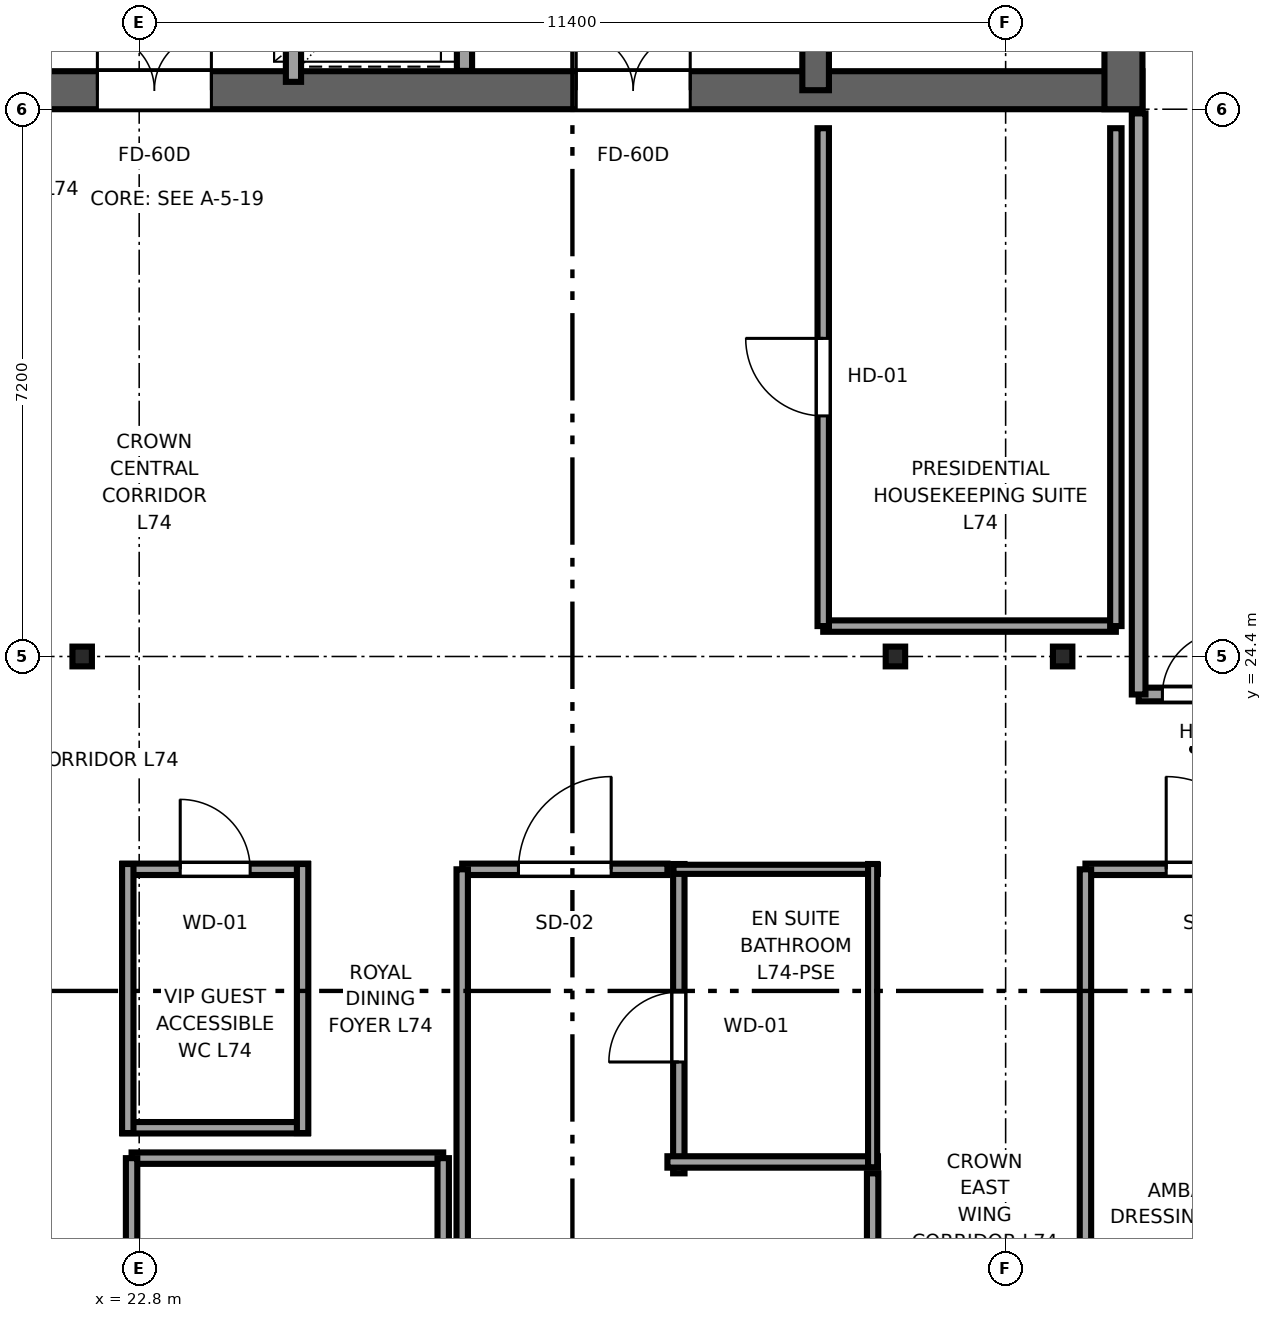
"""IFC4 building model, lengths in metres.
Left out: names, types, materials, properties, quantities, classifications, styles, units other than length and angle.
Written with IfcOpenShell. Run it as: python <this file> out.ifc"""

import sys

from ifc_helpers import new_model, si_unit, direction, frame, frame_2d, origin, origin_2d, place, context, subcontext, project, spatial, rectangle, i_section, extrude, source, transform, mapped, element, fill, save


model = new_model("IFC4")
c1 = context("Model", 3, precision=1e-05, world=origin(), true_north=direction((0.0, 1.0)))
c2 = subcontext(c1, "Body", "Model", "MODEL_VIEW")
j1 = project(units=[si_unit("LENGTHUNIT", "METRE"), si_unit("PLANEANGLEUNIT", "RADIAN")], contexts=[c1])
p1 = place(None, origin())
s1 = spatial("IfcSite", under=j1, at=p1, CompositionType="ELEMENT")
p2 = place(p1, origin())
s2 = spatial("IfcBuilding", under=s1, at=p2, CompositionType="ELEMENT")
p3 = place(p2, frame((0.0, 0.0, 278.6)))
s3 = spatial("IfcBuildingStorey", under=s2, at=p3, CompositionType="ELEMENT", Elevation=278.6)
p4 = place(p3, frame((10.0, 31.85, 0.0), z_axis=(0.0, 0.0, 1.0), x_axis=(1.0, 0.0, 0.0)))
e1 = element("IfcWall", 1, at=p4, inside=s3, PredefinedType="SHEAR", context=c2, shape_type="SweptSolid", body=[
    extrude(rectangle(XDim=26.0, YDim=0.5, at=frame_2d((13.0, 0.0))), origin(), (0.0, 0.0, 1.0), 3.55),
])
p5 = place(p4, frame((7.45, 0.0, 0.0), z_axis=(0.0, 0.0, 1.0), x_axis=(-1.0, 0.0, 0.0)))
e2 = element("IfcOpeningElement", 2, at=p5, cuts=e1, PredefinedType="OPENING", context=c2, shape_type="SweptSolid", body=[
    extrude(rectangle(XDim=1.5, YDim=2.04, at=frame_2d((0.75, 1.02))), frame((0.0, 0.26, 0.0), z_axis=(0.0, -1.0, 0.0), x_axis=(1.0, 0.0, 0.0)), (0.0, 0.0, 1.0), 0.52),
])
p6 = place(p4, frame((13.75, 0.0, 0.0), z_axis=(0.0, 0.0, 1.0), x_axis=(-1.0, 0.0, 0.0)))
e3 = element("IfcOpeningElement", 3, at=p6, cuts=e1, PredefinedType="OPENING", context=c2, shape_type="SweptSolid", body=[
    extrude(rectangle(XDim=1.5, YDim=2.04, at=frame_2d((0.75, 1.02))), frame((0.0, 0.26, 0.0), z_axis=(0.0, -1.0, 0.0), x_axis=(1.0, 0.0, 0.0)), (0.0, 0.0, 1.0), 0.52),
])
p7 = place(p4, frame((20.05, 0.0, 0.0), z_axis=(0.0, 0.0, 1.0), x_axis=(-1.0, 0.0, 0.0)))
e4 = element("IfcOpeningElement", 4, at=p7, cuts=e1, PredefinedType="OPENING", context=c2, shape_type="SweptSolid", body=[
    extrude(rectangle(XDim=1.5, YDim=2.04, at=frame_2d((0.75, 1.02))), frame((0.0, 0.26, 0.0), z_axis=(0.0, -1.0, 0.0), x_axis=(1.0, 0.0, 0.0)), (0.0, 0.0, 1.0), 0.52),
])
p8 = place(p3, frame((35.75, 31.6, 0.0), z_axis=(0.0, 0.0, 1.0), x_axis=(0.0, 1.0, 0.0)))
e5 = element("IfcWall", 5, at=p8, inside=s3, PredefinedType="SHEAR", context=c2, shape_type="SweptSolid", body=[
    extrude(rectangle(XDim=13.6, YDim=0.5, at=frame_2d((6.8, 0.0))), origin(), (0.0, 0.0, 1.0), 3.55),
])
p9 = place(p3, frame((31.7, 31.85, 0.0), z_axis=(0.0, 0.0, 1.0), x_axis=(0.0, 1.0, 0.0)))
e6 = element("IfcWall", 6, at=p9, inside=s3, PredefinedType="SHEAR", context=c2, shape_type="SweptSolid", body=[
    extrude(rectangle(XDim=13.1, YDim=0.35, at=frame_2d((6.55, 0.0))), origin(), (0.0, 0.0, 1.0), 3.55),
])
p10 = place(p9, frame((1.8, 0.0, 0.0), z_axis=(0.0, 0.0, 1.0), x_axis=(-1.0, 0.0, 0.0)))
e7 = element("IfcOpeningElement", 7, at=p10, cuts=e6, PredefinedType="OPENING", context=c2, shape_type="SweptSolid", body=[
    extrude(rectangle(XDim=1.1, YDim=2.12, at=frame_2d((0.55, 1.06))), frame((0.0, 0.185, 0.0), z_axis=(0.0, -1.0, 0.0), x_axis=(1.0, 0.0, 0.0)), (0.0, 0.0, 1.0), 0.37),
])
m1 = source(origin(), c2, "Body", "SweptSolid", [
    extrude(i_section(OverallWidth=0.256, OverallDepth=0.26, WebThickness=0.01, FlangeThickness=0.017, FilletRadius=0.014, at=origin_2d()), origin(), (0.0, 0.0, 1.0), 3.55),
])
for number, where, z_axis, x_axis in (
    (8, (22.05, 24.4, 0.0), (0.0, 0.0, 1.0), (1.0, 0.0, 0.0)),
    (9, (32.75, 24.4, 0.0), (0.0, 0.0, 1.0), (1.0, 0.0, 0.0)),
    (10, (34.95, 24.4, 0.0), (0.0, 0.0, 1.0), (1.0, 0.0, 0.0)),
):
    element("IfcColumn", number, at=place(p3, frame(where, z_axis=z_axis, x_axis=x_axis)), inside=s3, PredefinedType="COLUMN", context=c2, shape_type="MappedRepresentation", body=[
        mapped(m1, transform((0.0, 0.0, 0.0), x_axis=(1.0, 0.0, 0.0), y_axis=(0.0, 1.0, 0.0), z_axis=(0.0, 0.0, 1.0), scale=1.0)),
    ])
p11 = place(p3, frame((27.08, 32.104, 0.0), z_axis=(0.0, 0.0, 1.0), x_axis=(0.0, 1.0, 0.0)))
e11 = element("IfcWall", 11, at=p11, inside=s3, PredefinedType="SOLIDWALL", context=c2, shape_type="SweptSolid", body=[
    extrude(rectangle(XDim=4.046, YDim=0.2, at=frame_2d((2.023, 0.0))), origin(), (0.0, 0.0, 1.0), 3.33),
])
p12 = place(p3, frame((24.83, 31.96, 0.0), z_axis=(0.0, 0.0, 1.0), x_axis=(0.0, 1.0, 0.0)))
e12 = element("IfcWall", 12, at=p12, inside=s3, PredefinedType="SOLIDWALL", context=c2, shape_type="SweptSolid", body=[
    extrude(rectangle(XDim=5.08, YDim=0.2, at=frame_2d((2.54, 0.0))), origin(), (0.0, 0.0, 1.0), 3.33),
])
p13 = place(p12, frame((0.74, 0.0, 0.0)))
e13 = element("IfcOpeningElement", 13, at=p13, cuts=e12, PredefinedType="OPENING", context=c2, shape_type="SweptSolid", body=[
    extrude(rectangle(XDim=1.1, YDim=2.12, at=frame_2d((0.55, 1.06))), frame((0.0, 0.11, 0.0), z_axis=(0.0, -1.0, 0.0), x_axis=(1.0, 0.0, 0.0)), (0.0, 0.0, 1.0), 0.22),
])
p14 = place(p12, frame((3.24, 0.0, 0.0)))
e14 = element("IfcOpeningElement", 14, at=p14, cuts=e12, PredefinedType="OPENING", context=c2, shape_type="SweptSolid", body=[
    extrude(rectangle(XDim=1.1, YDim=2.12, at=frame_2d((0.55, 1.06))), frame((0.0, 0.11, 0.0), z_axis=(0.0, -1.0, 0.0), x_axis=(1.0, 0.0, 0.0)), (0.0, 0.0, 1.0), 0.22),
])
p15 = place(p3, frame((29.9, 17.6, 0.0), z_axis=(0.0, 0.0, 1.0), x_axis=(0.0, 1.0, 0.0)))
e15 = element("IfcWall", 15, at=p15, inside=s3, PredefinedType="PARTITIONING", context=c2, shape_type="SweptSolid", body=[
    extrude(rectangle(XDim=4.07, YDim=0.15, at=frame_2d((2.035, 0.0))), origin(), (0.0, 0.0, 1.0), 3.33),
])
p16 = place(p15, frame((1.465, 0.0, 0.0)))
e16 = element("IfcOpeningElement", 16, at=p16, cuts=e15, PredefinedType="OPENING", context=c2, shape_type="SweptSolid", body=[
    extrude(rectangle(XDim=0.92, YDim=2.01, at=frame_2d((0.46, 1.005))), frame((0.0, 0.085, 0.0), z_axis=(0.0, -1.0, 0.0), x_axis=(1.0, 0.0, 0.0)), (0.0, 0.0, 1.0), 0.17),
])
p17 = place(p3, frame((29.75, 17.75, 0.0), z_axis=(0.0, 0.0, 1.0), x_axis=(1.0, 0.0, 0.0)))
e17 = element("IfcWall", 17, at=p17, inside=s3, PredefinedType="PARTITIONING", context=c2, shape_type="SweptSolid", body=[
    extrude(rectangle(XDim=2.77, YDim=0.15, at=frame_2d((1.385, 0.0))), origin(), (0.0, 0.0, 1.0), 3.33),
])
p18 = place(p3, frame((29.83, 21.6, 0.0), z_axis=(0.0, 0.0, 1.0), x_axis=(1.0, 0.0, 0.0)))
e18 = element("IfcWall", 18, at=p18, inside=s3, PredefinedType="PLUMBINGWALL", context=c2, shape_type="SweptSolid", body=[
    extrude(rectangle(XDim=2.69, YDim=0.12, at=frame_2d((1.345, 0.0))), origin(), (0.0, 0.0, 1.0), 3.33),
])
p19 = place(p3, frame((32.45, 17.68, 0.0), z_axis=(0.0, 0.0, 1.0), x_axis=(0.0, 1.0, 0.0)))
e19 = element("IfcWall", 19, at=p19, inside=s3, PredefinedType="PLUMBINGWALL", context=c2, shape_type="SweptSolid", body=[
    extrude(rectangle(XDim=3.99, YDim=0.12, at=frame_2d((1.995, 0.0))), origin(), (0.0, 0.0, 1.0), 3.33),
])
p20 = place(p3, frame((22.7, 17.8, 0.0), z_axis=(0.0, 0.0, 1.0), x_axis=(1.0, 0.0, 0.0)))
e20 = element("IfcWall", 20, at=p20, inside=s3, PredefinedType="PARTITIONING", context=c2, shape_type="SweptSolid", body=[
    extrude(rectangle(XDim=4.1, YDim=0.15, at=frame_2d((2.05, 0.0))), origin(), (0.0, 0.0, 1.0), 3.33),
])
p21 = place(p3, frame((22.7, 5.605, 0.0), z_axis=(0.0, 0.0, 1.0), x_axis=(0.0, 1.0, 0.0)))
e21 = element("IfcWall", 21, at=p21, inside=s3, PredefinedType="PARTITIONING", context=c2, shape_type="SweptSolid", body=[
    extrude(rectangle(XDim=12.195, YDim=0.15, at=frame_2d((6.098, 0.0))), origin(), (0.0, 0.0, 1.0), 3.33),
])
p22 = place(p21, frame((5.272, 0.0, 0.0)))
e22 = element("IfcOpeningElement", 22, at=p22, cuts=e21, PredefinedType="OPENING", context=c2, shape_type="SweptSolid", body=[
    extrude(rectangle(XDim=1.65, YDim=2.15, at=frame_2d((0.825, 1.075))), frame((0.0, 0.085, 0.0), z_axis=(0.0, -1.0, 0.0), x_axis=(1.0, 0.0, 0.0)), (0.0, 0.0, 1.0), 0.17),
])
p23 = place(p3, frame((26.8, 5.605, 0.0), z_axis=(0.0, 0.0, 1.0), x_axis=(0.0, 1.0, 0.0)))
e23 = element("IfcWall", 23, at=p23, inside=s3, PredefinedType="PARTITIONING", context=c2, shape_type="SweptSolid", body=[
    extrude(rectangle(XDim=12.195, YDim=0.15, at=frame_2d((6.098, 0.0))), origin(), (0.0, 0.0, 1.0), 3.33),
])
p24 = place(p3, frame((27.05, 21.6, 0.0), z_axis=(0.0, 0.0, 1.0), x_axis=(1.0, 0.0, 0.0)))
e24 = element("IfcWall", 24, at=p24, inside=s3, PredefinedType="PARTITIONING", context=c2, shape_type="SweptSolid", body=[
    extrude(rectangle(XDim=2.7, YDim=0.15, at=frame_2d((1.35, 0.0))), origin(), (0.0, 0.0, 1.0), 3.33),
])
p25 = place(p24, frame((0.74, 0.0, 0.0)))
e25 = element("IfcOpeningElement", 25, at=p25, cuts=e24, PredefinedType="OPENING", context=c2, shape_type="SweptSolid", body=[
    extrude(rectangle(XDim=1.22, YDim=2.08, at=frame_2d((0.61, 1.04))), frame((0.0, 0.085, 0.0), z_axis=(0.0, -1.0, 0.0), x_axis=(1.0, 0.0, 0.0)), (0.0, 0.0, 1.0), 0.17),
])
p26 = place(p3, frame((32.45, 5.605, 0.0), z_axis=(0.0, 0.0, 1.0), x_axis=(0.0, 1.0, 0.0)))
e26 = element("IfcWall", 26, at=p26, inside=s3, PredefinedType="PARTITIONING", context=c2, shape_type="SweptSolid", body=[
    extrude(rectangle(XDim=11.995, YDim=0.15, at=frame_2d((5.998, 0.0))), origin(), (0.0, 0.0, 1.0), 3.33),
])
p27 = place(p3, frame((27.05, 5.605, 0.0), z_axis=(0.0, 0.0, 1.0), x_axis=(0.0, 1.0, 0.0)))
e27 = element("IfcWall", 27, at=p27, inside=s3, PredefinedType="PARTITIONING", context=c2, shape_type="SweptSolid", body=[
    extrude(rectangle(XDim=15.995, YDim=0.15, at=frame_2d((7.998, 0.0))), origin(), (0.0, 0.0, 1.0), 3.33),
])
p28 = place(p3, frame((35.25, 21.6, 0.0), z_axis=(0.0, 0.0, 1.0), x_axis=(1.0, 0.0, 0.0)))
e28 = element("IfcWall", 28, at=p28, inside=s3, PredefinedType="PARTITIONING", context=c2, shape_type="SweptSolid", body=[
    extrude(rectangle(XDim=3.345, YDim=0.15, at=frame_2d((1.672, 0.0))), origin(), (0.0, 0.0, 1.0), 3.33),
])
p29 = place(p28, frame((1.062, 0.0, 0.0)))
e29 = element("IfcOpeningElement", 29, at=p29, cuts=e28, PredefinedType="OPENING", context=c2, shape_type="SweptSolid", body=[
    extrude(rectangle(XDim=1.22, YDim=2.08, at=frame_2d((0.61, 1.04))), frame((0.0, 0.085, 0.0), z_axis=(0.0, -1.0, 0.0), x_axis=(1.0, 0.0, 0.0)), (0.0, 0.0, 1.0), 0.17),
])
p30 = place(p3, frame((35.25, 13.7, 0.0), z_axis=(0.0, 0.0, 1.0), x_axis=(0.0, 1.0, 0.0)))
e30 = element("IfcWall", 30, at=p30, inside=s3, PredefinedType="PARTITIONING", context=c2, shape_type="SweptSolid", body=[
    extrude(rectangle(XDim=7.9, YDim=0.15, at=frame_2d((3.95, 0.0))), origin(), (0.0, 0.0, 1.0), 3.33),
])
p31 = place(p3, frame((31.8, 24.8, 0.0), z_axis=(0.0, 0.0, 1.0), x_axis=(1.0, 0.0, 0.0)))
e31 = element("IfcWall", 31, at=p31, inside=s3, PredefinedType="PARTITIONING", context=c2, shape_type="SweptSolid", body=[
    extrude(rectangle(XDim=3.85, YDim=0.15, at=frame_2d((1.925, 0.0))), origin(), (0.0, 0.0, 1.0), 3.33),
])
p32 = place(p3, frame((31.8, 24.8, 0.0), z_axis=(0.0, 0.0, 1.0), x_axis=(0.0, 1.0, 0.0)))
e32 = element("IfcWall", 32, at=p32, inside=s3, PredefinedType="PARTITIONING", context=c2, shape_type="SweptSolid", body=[
    extrude(rectangle(XDim=6.55, YDim=0.15, at=frame_2d((3.275, 0.0))), origin(), (0.0, 0.0, 1.0), 3.33),
])
p33 = place(p32, frame((2.765, 0.0, 0.0)))
e33 = element("IfcOpeningElement", 33, at=p33, cuts=e32, PredefinedType="OPENING", context=c2, shape_type="SweptSolid", body=[
    extrude(rectangle(XDim=1.02, YDim=2.03, at=frame_2d((0.51, 1.015))), frame((0.0, 0.085, 0.0), z_axis=(0.0, -1.0, 0.0), x_axis=(1.0, 0.0, 0.0)), (0.0, 0.0, 1.0), 0.17),
])
p34 = place(p3, frame((35.65, 24.8, 0.0), z_axis=(0.0, 0.0, 1.0), x_axis=(0.0, 1.0, 0.0)))
e34 = element("IfcWall", 34, at=p34, inside=s3, PredefinedType="PARTITIONING", context=c2, shape_type="SweptSolid", body=[
    extrude(rectangle(XDim=6.55, YDim=0.15, at=frame_2d((3.275, 0.0))), origin(), (0.0, 0.0, 1.0), 3.33),
])
p35 = place(p3, frame((22.58, 18.2, 0.0), z_axis=(0.0, 0.0, 1.0), x_axis=(1.0, 0.0, 0.0)))
e35 = element("IfcWall", 35, at=p35, inside=s3, PredefinedType="PARTITIONING", context=c2, shape_type="SweptSolid", body=[
    extrude(rectangle(XDim=2.44, YDim=0.15, at=frame_2d((1.22, 0.0))), origin(), (0.0, 0.0, 1.0), 3.33),
])
p36 = place(p3, frame((22.58, 21.6, 0.0), z_axis=(0.0, 0.0, 1.0), x_axis=(1.0, 0.0, 0.0)))
e36 = element("IfcWall", 36, at=p36, inside=s3, PredefinedType="PARTITIONING", context=c2, shape_type="SweptSolid", body=[
    extrude(rectangle(XDim=2.44, YDim=0.15, at=frame_2d((1.22, 0.0))), origin(), (0.0, 0.0, 1.0), 3.33),
])
p37 = place(p36, frame((0.76, 0.0, 0.0)))
e37 = element("IfcOpeningElement", 37, at=p37, cuts=e36, PredefinedType="OPENING", context=c2, shape_type="SweptSolid", body=[
    extrude(rectangle(XDim=0.92, YDim=2.01, at=frame_2d((0.46, 1.005))), frame((0.0, 0.085, 0.0), z_axis=(0.0, -1.0, 0.0), x_axis=(1.0, 0.0, 0.0)), (0.0, 0.0, 1.0), 0.17),
])
for number, where, z_axis, x_axis in (
    (38, (22.65, 18.13, 0.0), (0.0, 0.0, 1.0), (0.0, 1.0, 0.0)),
    (39, (24.95, 18.13, 0.0), (0.0, 0.0, 1.0), (0.0, 1.0, 0.0)),
):
    element("IfcWall", number, at=place(p3, frame(where, z_axis=z_axis, x_axis=x_axis)), inside=s3, PredefinedType="PARTITIONING", context=c2, shape_type="SweptSolid", body=[
        extrude(rectangle(XDim=3.54, YDim=0.15, at=frame_2d((1.77, 0.0))), origin(), (0.0, 0.0, 1.0), 3.33),
    ])
p38 = place(p3, frame((35.95, 23.9, 0.0), z_axis=(0.0, 0.0, 1.0), x_axis=(1.0, 0.0, 0.0)))
e40 = element("IfcWall", 40, at=p38, inside=s3, PredefinedType="PARTITIONING", context=c2, shape_type="SweptSolid", body=[
    extrude(rectangle(XDim=2.645, YDim=0.18, at=frame_2d((1.323, 0.0))), origin(), (0.0, 0.0, 1.0), 3.33),
])
p39 = place(p38, frame((0.312, 0.0, 0.0)))
e41 = element("IfcOpeningElement", 41, at=p39, cuts=e40, PredefinedType="OPENING", context=c2, shape_type="SweptSolid", body=[
    extrude(rectangle(XDim=0.82, YDim=2.01, at=frame_2d((0.41, 1.005))), frame((0.0, 0.1, 0.0), z_axis=(0.0, -1.0, 0.0), x_axis=(1.0, 0.0, 0.0)), (0.0, 0.0, 1.0), 0.2),
])
p40 = place(p3, frame((35.95, 23.9, 0.0), z_axis=(0.0, 0.0, 1.0), x_axis=(0.0, 1.0, 0.0)))
e42 = element("IfcWall", 42, at=p40, inside=s3, PredefinedType="PARTITIONING", context=c2, shape_type="SweptSolid", body=[
    extrude(rectangle(XDim=7.645, YDim=0.18, at=frame_2d((3.823, 0.0))), origin(), (0.0, 0.0, 1.0), 3.33),
])
m2 = source(origin(), c2, "Body", "SweptSolid", [
    extrude(rectangle(XDim=1.5, YDim=2.04, at=frame_2d((0.75, 1.02))), frame((0.0, 0.025, 0.0), z_axis=(0.0, -1.0, 0.0), x_axis=(1.0, 0.0, 0.0)), (0.0, 0.0, 1.0), 0.05),
])
p41 = place(p6, origin())
e43 = element("IfcDoor", 43, at=p41, inside=s3, OperationType="DOUBLE_DOOR_SINGLE_SWING", PredefinedType="DOOR", context=c2, shape_type="MappedRepresentation", body=[
    mapped(m2, transform((0.0, 0.0, 0.0), x_axis=(1.0, 0.0, 0.0), y_axis=(0.0, 1.0, 0.0), z_axis=(0.0, 0.0, 1.0), scale=1.0)),
])
fill(e3, e43)
p42 = place(p7, origin())
e44 = element("IfcDoor", 44, at=p42, inside=s3, OperationType="DOUBLE_DOOR_SINGLE_SWING", PredefinedType="DOOR", context=c2, shape_type="MappedRepresentation", body=[
    mapped(m2, transform((0.0, 0.0, 0.0), x_axis=(1.0, 0.0, 0.0), y_axis=(0.0, 1.0, 0.0), z_axis=(0.0, 0.0, 1.0), scale=1.0)),
])
fill(e4, e44)
m3 = source(origin(), c2, "Body", "SweptSolid", [
    extrude(rectangle(XDim=0.92, YDim=2.01, at=frame_2d((0.46, 1.005))), frame((0.0, 0.025, 0.0), z_axis=(0.0, -1.0, 0.0), x_axis=(1.0, 0.0, 0.0)), (0.0, 0.0, 1.0), 0.05),
])
p43 = place(p16, origin())
e45 = element("IfcDoor", 45, at=p43, inside=s3, OperationType="SINGLE_SWING_LEFT", PredefinedType="DOOR", context=c2, shape_type="MappedRepresentation", body=[
    mapped(m3, transform((0.0, 0.0, 0.0), x_axis=(1.0, 0.0, 0.0), y_axis=(0.0, 1.0, 0.0), z_axis=(0.0, 0.0, 1.0), scale=1.0)),
])
fill(e16, e45)
m4 = source(origin(), c2, "Body", "SweptSolid", [
    extrude(rectangle(XDim=1.22, YDim=2.08, at=frame_2d((0.61, 1.04))), frame((0.0, 0.025, 0.0), z_axis=(0.0, -1.0, 0.0), x_axis=(1.0, 0.0, 0.0)), (0.0, 0.0, 1.0), 0.05),
])
p44 = place(p25, origin())
e46 = element("IfcDoor", 46, at=p44, inside=s3, OperationType="SINGLE_SWING_RIGHT", PredefinedType="DOOR", context=c2, shape_type="MappedRepresentation", body=[
    mapped(m4, transform((0.0, 0.0, 0.0), x_axis=(1.0, 0.0, 0.0), y_axis=(0.0, 1.0, 0.0), z_axis=(0.0, 0.0, 1.0), scale=1.0)),
])
fill(e25, e46)
p45 = place(p29, origin())
e47 = element("IfcDoor", 47, at=p45, inside=s3, OperationType="SINGLE_SWING_LEFT", PredefinedType="DOOR", context=c2, shape_type="MappedRepresentation", body=[
    mapped(m4, transform((0.0, 0.0, 0.0), x_axis=(1.0, 0.0, 0.0), y_axis=(0.0, 1.0, 0.0), z_axis=(0.0, 0.0, 1.0), scale=1.0)),
])
fill(e29, e47)
m5 = source(origin(), c2, "Body", "SweptSolid", [
    extrude(rectangle(XDim=1.02, YDim=2.03, at=frame_2d((0.51, 1.015))), frame((0.0, 0.025, 0.0), z_axis=(0.0, -1.0, 0.0), x_axis=(1.0, 0.0, 0.0)), (0.0, 0.0, 1.0), 0.05),
])
p46 = place(p33, origin())
e48 = element("IfcDoor", 48, at=p46, inside=s3, OperationType="SINGLE_SWING_RIGHT", PredefinedType="DOOR", context=c2, shape_type="MappedRepresentation", body=[
    mapped(m5, transform((0.0, 0.0, 0.0), x_axis=(1.0, 0.0, 0.0), y_axis=(0.0, 1.0, 0.0), z_axis=(0.0, 0.0, 1.0), scale=1.0)),
])
fill(e33, e48)
p47 = place(p37, origin())
e49 = element("IfcDoor", 49, at=p47, inside=s3, OperationType="SINGLE_SWING_LEFT", PredefinedType="DOOR", context=c2, shape_type="MappedRepresentation", body=[
    mapped(m3, transform((0.0, 0.0, 0.0), x_axis=(1.0, 0.0, 0.0), y_axis=(0.0, 1.0, 0.0), z_axis=(0.0, 0.0, 1.0), scale=1.0)),
])
fill(e37, e49)
m6 = source(origin(), c2, "Body", "SweptSolid", [
    extrude(rectangle(XDim=0.82, YDim=2.01, at=frame_2d((0.41, 1.005))), frame((0.0, 0.025, 0.0), z_axis=(0.0, -1.0, 0.0), x_axis=(1.0, 0.0, 0.0)), (0.0, 0.0, 1.0), 0.05),
])
p48 = place(p39, origin())
e50 = element("IfcDoor", 50, at=p48, inside=s3, OperationType="SINGLE_SWING_RIGHT", PredefinedType="DOOR", context=c2, shape_type="MappedRepresentation", body=[
    mapped(m6, transform((0.0, 0.0, 0.0), x_axis=(1.0, 0.0, 0.0), y_axis=(0.0, 1.0, 0.0), z_axis=(0.0, 0.0, 1.0), scale=1.0)),
])
fill(e41, e50)
save(model, sys.argv[1])
